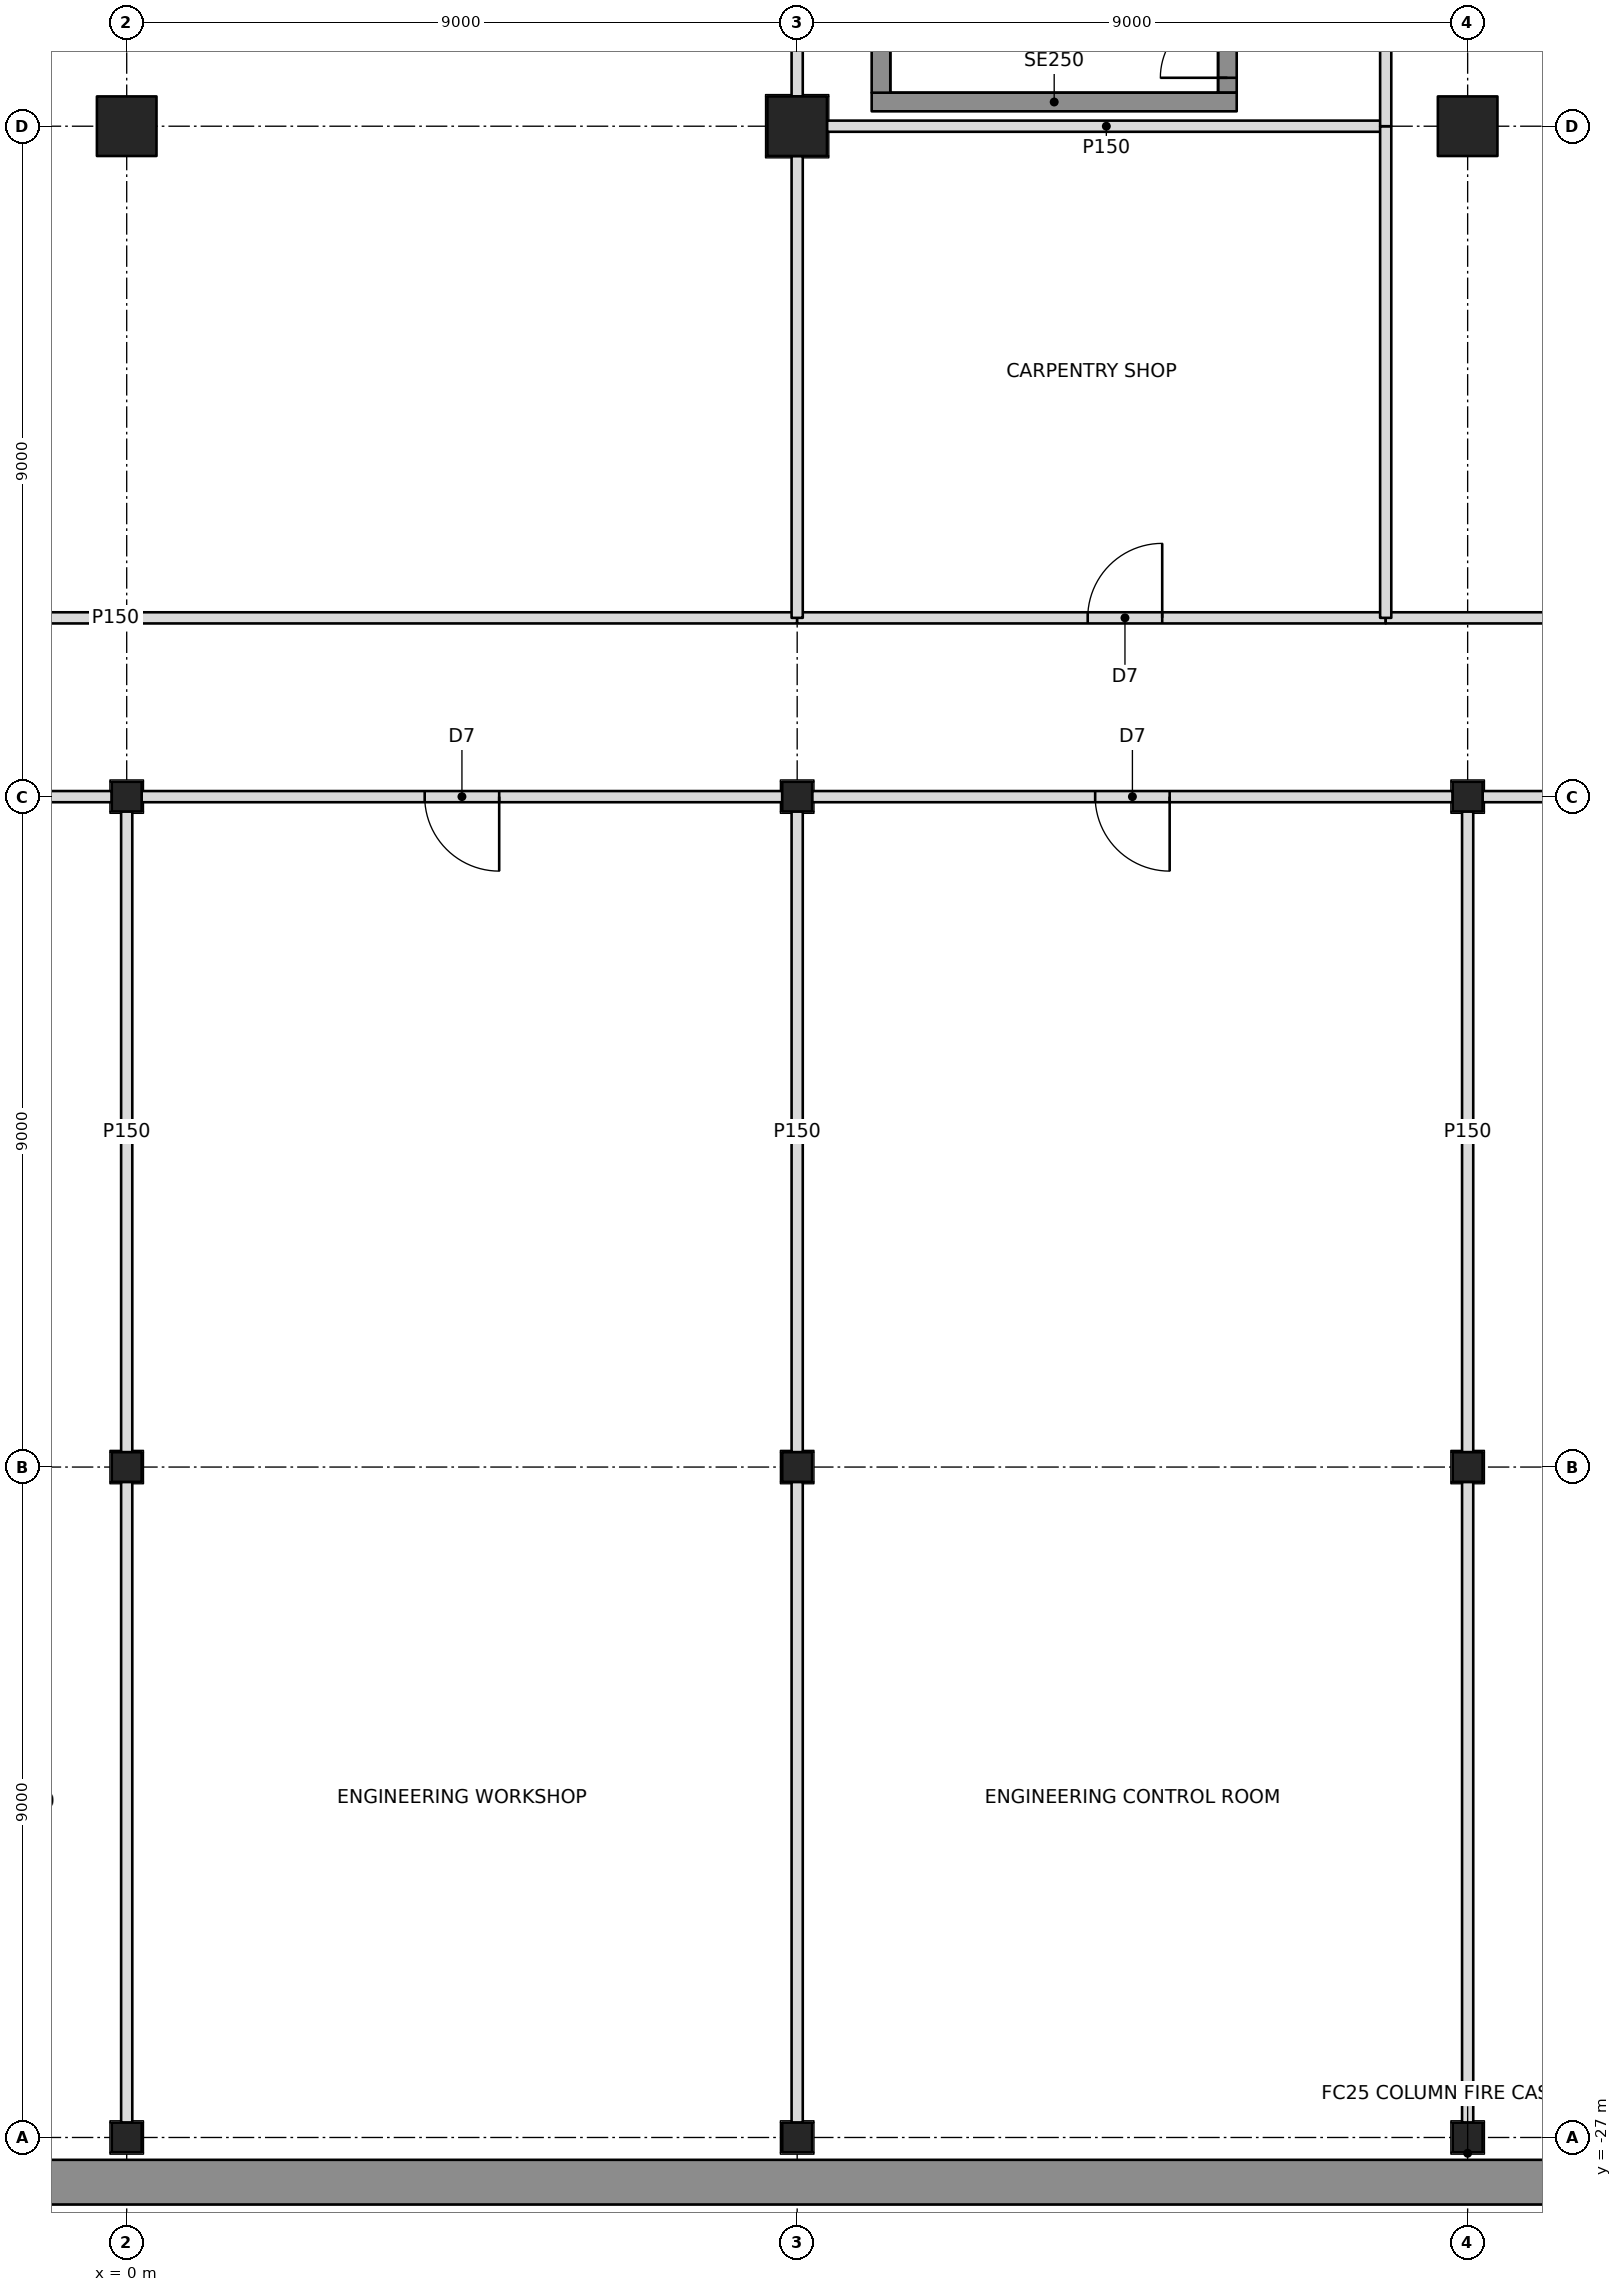
"""IFC4 building model, lengths in metres.
Left out: names, types, materials, properties, quantities, classifications, styles, units other than length and angle.
Written with IfcOpenShell. Run it as: python <this file> out.ifc"""

import sys

from ifc_helpers import new_model, si_unit, direction, frame, frame_2d, origin, origin_2d, place, context, subcontext, project, spatial, rectangle, hollow_rectangle, i_section, extrude, element, fill, save


model = new_model("IFC4")
c1 = context("Model", 3, precision=1e-05, world=origin(), true_north=direction((0.0, 1.0)))
c2 = subcontext(c1, "Body", "Model", "MODEL_VIEW")
j1 = project(units=[si_unit("LENGTHUNIT", "METRE"), si_unit("PLANEANGLEUNIT", "RADIAN")], contexts=[c1])
p1 = place(None, origin())
s1 = spatial("IfcSite", under=j1, at=p1, CompositionType="ELEMENT")
p2 = place(p1, origin())
s2 = spatial("IfcBuilding", under=s1, at=p2, CompositionType="ELEMENT")
p3 = place(p2, frame((0.0, 0.0, -10.5)))
s3 = spatial("IfcBuildingStorey", under=s2, at=p3, CompositionType="ELEMENT", Elevation=-10.5)
for number, where, z_axis, x_axis in (
    (1, (0.0, -27.0, -0.5), (0.0, 0.0, 1.0), (1.0, 0.0, 0.0)),
    (2, (0.0, -18.0, -0.5), (0.0, 0.0, 1.0), (1.0, 0.0, 0.0)),
    (3, (0.0, -9.0, -0.5), (0.0, 0.0, 1.0), (1.0, 0.0, 0.0)),
):
    element("IfcColumn", number, at=place(p3, frame(where, z_axis=z_axis, x_axis=x_axis)), inside=s3, PredefinedType="COLUMN", context=c2, shape_type="SweptSolid", body=[
        extrude(i_section(OverallWidth=0.401, OverallDepth=0.399, WebThickness=0.025, FlangeThickness=0.04, at=origin_2d()), origin(), (0.0, 0.0, 1.0), 5.5),
    ])
p4 = place(p3, frame((0.0, 0.0, -0.5), z_axis=(0.0, 0.0, 1.0), x_axis=(1.0, 0.0, 0.0)))
e4 = element("IfcColumn", 4, at=p4, inside=s3, PredefinedType="COLUMN", context=c2, shape_type="SweptSolid", body=[
    extrude(hollow_rectangle(XDim=0.8, YDim=0.8, WallThickness=0.1, at=origin_2d()), origin(), (0.0, 0.0, 1.0), 5.5),
])
for number, where, z_axis, x_axis in (
    (5, (9.0, -27.0, -0.5), (0.0, 0.0, 1.0), (1.0, 0.0, 0.0)),
    (6, (9.0, -18.0, -0.5), (0.0, 0.0, 1.0), (1.0, 0.0, 0.0)),
    (7, (9.0, -9.0, -0.5), (0.0, 0.0, 1.0), (1.0, 0.0, 0.0)),
):
    element("IfcColumn", number, at=place(p3, frame(where, z_axis=z_axis, x_axis=x_axis)), inside=s3, PredefinedType="COLUMN", context=c2, shape_type="SweptSolid", body=[
        extrude(i_section(OverallWidth=0.401, OverallDepth=0.399, WebThickness=0.025, FlangeThickness=0.04, at=origin_2d()), origin(), (0.0, 0.0, 1.0), 5.5),
    ])
p5 = place(p3, frame((9.0, 0.0, -0.5), z_axis=(0.0, 0.0, 1.0), x_axis=(1.0, 0.0, 0.0)))
e8 = element("IfcColumn", 8, at=p5, inside=s3, PredefinedType="COLUMN", context=c2, shape_type="SweptSolid", body=[
    extrude(hollow_rectangle(XDim=0.8, YDim=0.8, WallThickness=0.1, at=origin_2d()), origin(), (0.0, 0.0, 1.0), 5.5),
])
for number, where, z_axis, x_axis in (
    (9, (18.0, -27.0, -0.5), (0.0, 0.0, 1.0), (1.0, 0.0, 0.0)),
    (10, (18.0, -18.0, -0.5), (0.0, 0.0, 1.0), (1.0, 0.0, 0.0)),
    (11, (18.0, -9.0, -0.5), (0.0, 0.0, 1.0), (1.0, 0.0, 0.0)),
):
    element("IfcColumn", number, at=place(p3, frame(where, z_axis=z_axis, x_axis=x_axis)), inside=s3, PredefinedType="COLUMN", context=c2, shape_type="SweptSolid", body=[
        extrude(i_section(OverallWidth=0.401, OverallDepth=0.399, WebThickness=0.025, FlangeThickness=0.04, at=origin_2d()), origin(), (0.0, 0.0, 1.0), 5.5),
    ])
p6 = place(p3, frame((18.0, 0.0, -0.5), z_axis=(0.0, 0.0, 1.0), x_axis=(1.0, 0.0, 0.0)))
e12 = element("IfcColumn", 12, at=p6, inside=s3, PredefinedType="COLUMN", context=c2, shape_type="SweptSolid", body=[
    extrude(hollow_rectangle(XDim=0.8, YDim=0.8, WallThickness=0.1, at=origin_2d()), origin(), (0.0, 0.0, 1.0), 5.5),
])
p7 = place(p3, frame((-9.6, -27.6, 0.0), z_axis=(0.0, 0.0, 1.0), x_axis=(1.0, 0.0, 0.0)))
e13 = element("IfcWall", 13, at=p7, inside=s3, PredefinedType="SOLIDWALL", context=c2, shape_type="SweptSolid", body=[
    extrude(rectangle(XDim=73.2, YDim=0.6, at=frame_2d((36.6, 0.0))), origin(), (0.0, 0.0, 1.0), 4.7),
])
p8 = place(p3, frame((-8.801, -9.0, 0.0), z_axis=(0.0, 0.0, 1.0), x_axis=(1.0, 0.0, 0.0)))
e14 = element("IfcWall", 14, at=p8, inside=s3, PredefinedType="PARTITIONING", context=c2, shape_type="SweptSolid", body=[
    extrude(rectangle(XDim=8.6, YDim=0.15, at=frame_2d((4.3, 0.0))), origin(), (0.0, 0.0, 1.0), 3.842),
])
p9 = place(p8, frame((3.801, 0.0, 0.0)))
e15 = element("IfcOpeningElement", 15, at=p9, cuts=e14, PredefinedType="OPENING", context=c2, shape_type="SweptSolid", body=[
    extrude(rectangle(XDim=1.0, YDim=2.1, at=frame_2d((0.5, 1.05))), frame((0.0, 0.085, 0.0), z_axis=(0.0, -1.0, 0.0), x_axis=(1.0, 0.0, 0.0)), (0.0, 0.0, 1.0), 0.17),
])
p10 = place(p3, frame((9.0, -6.6, 0.0), z_axis=(0.0, 0.0, 1.0), x_axis=(-1.0, 0.0, 0.0)))
e16 = element("IfcWall", 16, at=p10, inside=s3, PredefinedType="PARTITIONING", context=c2, shape_type="SweptSolid", body=[
    extrude(rectangle(XDim=18.3, YDim=0.15, at=frame_2d((9.15, 0.0))), origin(), (0.0, 0.0, 1.0), 3.841),
])
for number, where, z_axis, x_axis in (
    (17, (0.0, -9.199, 0.0), (0.0, 0.0, 1.0), (0.0, -1.0, 0.0)),
    (18, (0.0, -18.199, 0.0), (0.0, 0.0, 1.0), (0.0, -1.0, 0.0)),
):
    element("IfcWall", number, at=place(p3, frame(where, z_axis=z_axis, x_axis=x_axis)), inside=s3, PredefinedType="PARTITIONING", context=c2, shape_type="SweptSolid", body=[
        extrude(rectangle(XDim=8.601, YDim=0.15, at=frame_2d((4.301, 0.0))), origin(), (0.0, 0.0, 1.0), 3.842),
    ])
p11 = place(p3, frame((0.201, -9.0, 0.0), z_axis=(0.0, 0.0, 1.0), x_axis=(1.0, 0.0, 0.0)))
e19 = element("IfcWall", 19, at=p11, inside=s3, PredefinedType="PARTITIONING", context=c2, shape_type="SweptSolid", body=[
    extrude(rectangle(XDim=8.599, YDim=0.15, at=frame_2d((4.299, 0.0))), origin(), (0.0, 0.0, 1.0), 3.842),
])
p12 = place(p11, frame((3.799, 0.0, 0.0)))
e20 = element("IfcOpeningElement", 20, at=p12, cuts=e19, PredefinedType="OPENING", context=c2, shape_type="SweptSolid", body=[
    extrude(rectangle(XDim=1.0, YDim=2.1, at=frame_2d((0.5, 1.05))), frame((0.0, 0.085, 0.0), z_axis=(0.0, -1.0, 0.0), x_axis=(1.0, 0.0, 0.0)), (0.0, 0.0, 1.0), 0.17),
])
for number, where, z_axis, x_axis in (
    (21, (9.0, -9.199, 0.0), (0.0, 0.0, 1.0), (0.0, -1.0, 0.0)),
    (22, (9.0, -18.199, 0.0), (0.0, 0.0, 1.0), (0.0, -1.0, 0.0)),
):
    element("IfcWall", number, at=place(p3, frame(where, z_axis=z_axis, x_axis=x_axis)), inside=s3, PredefinedType="PARTITIONING", context=c2, shape_type="SweptSolid", body=[
        extrude(rectangle(XDim=8.601, YDim=0.15, at=frame_2d((4.301, 0.0))), origin(), (0.0, 0.0, 1.0), 3.842),
    ])
p13 = place(p3, frame((9.201, -9.0, 0.0), z_axis=(0.0, 0.0, 1.0), x_axis=(1.0, 0.0, 0.0)))
e23 = element("IfcWall", 23, at=p13, inside=s3, PredefinedType="PARTITIONING", context=c2, shape_type="SweptSolid", body=[
    extrude(rectangle(XDim=8.599, YDim=0.15, at=frame_2d((4.299, 0.0))), origin(), (0.0, 0.0, 1.0), 3.842),
])
p14 = place(p13, frame((3.799, 0.0, 0.0)))
e24 = element("IfcOpeningElement", 24, at=p14, cuts=e23, PredefinedType="OPENING", context=c2, shape_type="SweptSolid", body=[
    extrude(rectangle(XDim=1.0, YDim=2.1, at=frame_2d((0.5, 1.05))), frame((0.0, 0.085, 0.0), z_axis=(0.0, -1.0, 0.0), x_axis=(1.0, 0.0, 0.0)), (0.0, 0.0, 1.0), 0.17),
])
p15 = place(p3, frame((16.9, -6.6, 0.0), z_axis=(0.0, 0.0, 1.0), x_axis=(-1.0, 0.0, 0.0)))
e25 = element("IfcWall", 25, at=p15, inside=s3, PredefinedType="PARTITIONING", context=c2, shape_type="SweptSolid", body=[
    extrude(rectangle(XDim=7.9, YDim=0.15, at=frame_2d((3.95, 0.0))), origin(), (0.0, 0.0, 1.0), 3.841),
])
p16 = place(p15, frame((3.0, 0.0, 0.0)))
e26 = element("IfcOpeningElement", 26, at=p16, cuts=e25, PredefinedType="OPENING", context=c2, shape_type="SweptSolid", body=[
    extrude(rectangle(XDim=1.0, YDim=2.1, at=frame_2d((0.5, 1.05))), frame((0.0, 0.085, 0.0), z_axis=(0.0, -1.0, 0.0), x_axis=(1.0, 0.0, 0.0)), (0.0, 0.0, 1.0), 0.17),
])
p17 = place(p3, frame((9.0, -0.4, 0.0), z_axis=(0.0, 0.0, 1.0), x_axis=(0.0, -1.0, 0.0)))
e27 = element("IfcWall", 27, at=p17, inside=s3, PredefinedType="PARTITIONING", context=c2, shape_type="SweptSolid", body=[
    extrude(rectangle(XDim=6.2, YDim=0.15, at=frame_2d((3.1, 0.0))), origin(), (0.0, 0.0, 1.0), 3.842),
])
p18 = place(p3, frame((9.4, 0.0, 0.0), z_axis=(0.0, 0.0, 1.0), x_axis=(1.0, 0.0, 0.0)))
e28 = element("IfcWall", 28, at=p18, inside=s3, PredefinedType="PARTITIONING", context=c2, shape_type="SweptSolid", body=[
    extrude(rectangle(XDim=7.5, YDim=0.15, at=frame_2d((3.75, 0.0))), origin(), (0.0, 0.0, 1.0), 3.842),
])
p19 = place(p3, frame((9.0, 8.6, 0.0), z_axis=(0.0, 0.0, 1.0), x_axis=(0.0, -1.0, 0.0)))
e29 = element("IfcWall", 29, at=p19, inside=s3, PredefinedType="PARTITIONING", context=c2, shape_type="SweptSolid", body=[
    extrude(rectangle(XDim=8.2, YDim=0.15, at=frame_2d((4.1, 0.0))), origin(), (0.0, 0.0, 1.0), 3.842),
])
p20 = place(p3, frame((26.0, -6.6, 0.0), z_axis=(0.0, 0.0, 1.0), x_axis=(-1.0, 0.0, 0.0)))
e30 = element("IfcWall", 30, at=p20, inside=s3, PredefinedType="PARTITIONING", context=c2, shape_type="SweptSolid", body=[
    extrude(rectangle(XDim=9.1, YDim=0.15, at=frame_2d((4.55, 0.0))), origin(), (0.0, 0.0, 1.0), 3.841),
])
p21 = place(p3, frame((16.9, 0.0, 0.0), z_axis=(0.0, 0.0, 1.0), x_axis=(0.0, -1.0, 0.0)))
e31 = element("IfcWall", 31, at=p21, inside=s3, PredefinedType="PARTITIONING", context=c2, shape_type="SweptSolid", body=[
    extrude(rectangle(XDim=6.6, YDim=0.15, at=frame_2d((3.3, 0.0))), origin(), (0.0, 0.0, 1.0), 3.841),
])
p22 = place(p3, frame((16.9, 0.0, 0.0), z_axis=(0.0, 0.0, 1.0), x_axis=(0.0, 1.0, 0.0)))
e32 = element("IfcWall", 32, at=p22, inside=s3, PredefinedType="PARTITIONING", context=c2, shape_type="SweptSolid", body=[
    extrude(rectangle(XDim=8.8, YDim=0.15, at=frame_2d((4.4, 0.0))), origin(), (0.0, 0.0, 1.0), 3.841),
])
for number, where, z_axis, x_axis in (
    (33, (18.0, -9.199, 0.0), (0.0, 0.0, 1.0), (0.0, -1.0, 0.0)),
    (34, (18.0, -18.199, 0.0), (0.0, 0.0, 1.0), (0.0, -1.0, 0.0)),
):
    element("IfcWall", number, at=place(p3, frame(where, z_axis=z_axis, x_axis=x_axis)), inside=s3, PredefinedType="PARTITIONING", context=c2, shape_type="SweptSolid", body=[
        extrude(rectangle(XDim=8.601, YDim=0.15, at=frame_2d((4.301, 0.0))), origin(), (0.0, 0.0, 1.0), 3.842),
    ])
p23 = place(p3, frame((18.201, -9.0, 0.0), z_axis=(0.0, 0.0, 1.0), x_axis=(1.0, 0.0, 0.0)))
e35 = element("IfcWall", 35, at=p23, inside=s3, PredefinedType="PARTITIONING", context=c2, shape_type="SweptSolid", body=[
    extrude(rectangle(XDim=8.599, YDim=0.15, at=frame_2d((4.299, 0.0))), origin(), (0.0, 0.0, 1.0), 3.842),
])
p24 = place(p23, frame((3.799, 0.0, 0.0)))
e36 = element("IfcOpeningElement", 36, at=p24, cuts=e35, PredefinedType="OPENING", context=c2, shape_type="SweptSolid", body=[
    extrude(rectangle(XDim=1.0, YDim=2.1, at=frame_2d((0.5, 1.05))), frame((0.0, 0.085, 0.0), z_axis=(0.0, -1.0, 0.0), x_axis=(1.0, 0.0, 0.0)), (0.0, 0.0, 1.0), 0.17),
])
p25 = place(p3, frame((10.0, 0.325, 0.0), z_axis=(0.0, 0.0, 1.0), x_axis=(1.0, 0.0, 0.0)))
e37 = element("IfcWall", 37, at=p25, inside=s3, PredefinedType="SOLIDWALL", context=c2, shape_type="SweptSolid", body=[
    extrude(rectangle(XDim=4.9, YDim=0.25, at=frame_2d((2.45, 0.0))), origin(), (0.0, 0.0, 1.0), 4.7),
])
p26 = place(p3, frame((10.125, 0.45, 0.0), z_axis=(0.0, 0.0, 1.0), x_axis=(0.0, 1.0, 0.0)))
e38 = element("IfcWall", 38, at=p26, inside=s3, PredefinedType="SOLIDWALL", context=c2, shape_type="SweptSolid", body=[
    extrude(rectangle(XDim=8.1, YDim=0.25, at=frame_2d((4.05, 0.0))), origin(), (0.0, 0.0, 1.0), 4.7),
])
p27 = place(p3, frame((14.775, 0.45, 0.0), z_axis=(0.0, 0.0, 1.0), x_axis=(0.0, 1.0, 0.0)))
e39 = element("IfcWall", 39, at=p27, inside=s3, PredefinedType="SOLIDWALL", context=c2, shape_type="SweptSolid", body=[
    extrude(rectangle(XDim=8.1, YDim=0.25, at=frame_2d((4.05, 0.0))), origin(), (0.0, 0.0, 1.0), 4.7),
])
p28 = place(p27, frame((0.2, 0.0, 0.0)))
e40 = element("IfcOpeningElement", 40, at=p28, cuts=e39, PredefinedType="OPENING", context=c2, shape_type="SweptSolid", body=[
    extrude(rectangle(XDim=1.8, YDim=2.1, at=frame_2d((0.9, 1.05))), frame((0.0, 0.135, 0.0), z_axis=(0.0, -1.0, 0.0), x_axis=(1.0, 0.0, 0.0)), (0.0, 0.0, 1.0), 0.27),
])
p29 = place(p12, frame((1.0, 0.0, 0.0), z_axis=(0.0, 0.0, 1.0), x_axis=(-1.0, 0.0, 0.0)))
e41 = element("IfcDoor", 41, at=p29, inside=s3, OperationType="SINGLE_SWING_LEFT", PredefinedType="DOOR", context=c2, shape_type="SweptSolid", body=[
    extrude(rectangle(XDim=1.0, YDim=2.1, at=frame_2d((0.5, 1.05))), frame((0.0, 0.025, 0.0), z_axis=(0.0, -1.0, 0.0), x_axis=(1.0, 0.0, 0.0)), (0.0, 0.0, 1.0), 0.05),
])
fill(e20, e41)
p30 = place(p14, frame((1.0, 0.0, 0.0), z_axis=(0.0, 0.0, 1.0), x_axis=(-1.0, 0.0, 0.0)))
e42 = element("IfcDoor", 42, at=p30, inside=s3, OperationType="SINGLE_SWING_LEFT", PredefinedType="DOOR", context=c2, shape_type="SweptSolid", body=[
    extrude(rectangle(XDim=1.0, YDim=2.1, at=frame_2d((0.5, 1.05))), frame((0.0, 0.025, 0.0), z_axis=(0.0, -1.0, 0.0), x_axis=(1.0, 0.0, 0.0)), (0.0, 0.0, 1.0), 0.05),
])
fill(e24, e42)
p31 = place(p16, frame((1.0, 0.0, 0.0), z_axis=(0.0, 0.0, 1.0), x_axis=(-1.0, 0.0, 0.0)))
e43 = element("IfcDoor", 43, at=p31, inside=s3, OperationType="SINGLE_SWING_RIGHT", PredefinedType="DOOR", context=c2, shape_type="SweptSolid", body=[
    extrude(rectangle(XDim=1.0, YDim=2.1, at=frame_2d((0.5, 1.05))), frame((0.0, 0.025, 0.0), z_axis=(0.0, -1.0, 0.0), x_axis=(1.0, 0.0, 0.0)), (0.0, 0.0, 1.0), 0.05),
])
fill(e26, e43)
p32 = place(p28, origin())
e44 = element("IfcDoor", 44, at=p32, inside=s3, OperationType="DOUBLE_DOOR_SINGLE_SWING", PredefinedType="DOOR", context=c2, shape_type="SweptSolid", body=[
    extrude(rectangle(XDim=1.8, YDim=2.1, at=frame_2d((0.9, 1.05))), frame((0.0, 0.025, 0.0), z_axis=(0.0, -1.0, 0.0), x_axis=(1.0, 0.0, 0.0)), (0.0, 0.0, 1.0), 0.05),
])
fill(e40, e44)
save(model, sys.argv[1])
